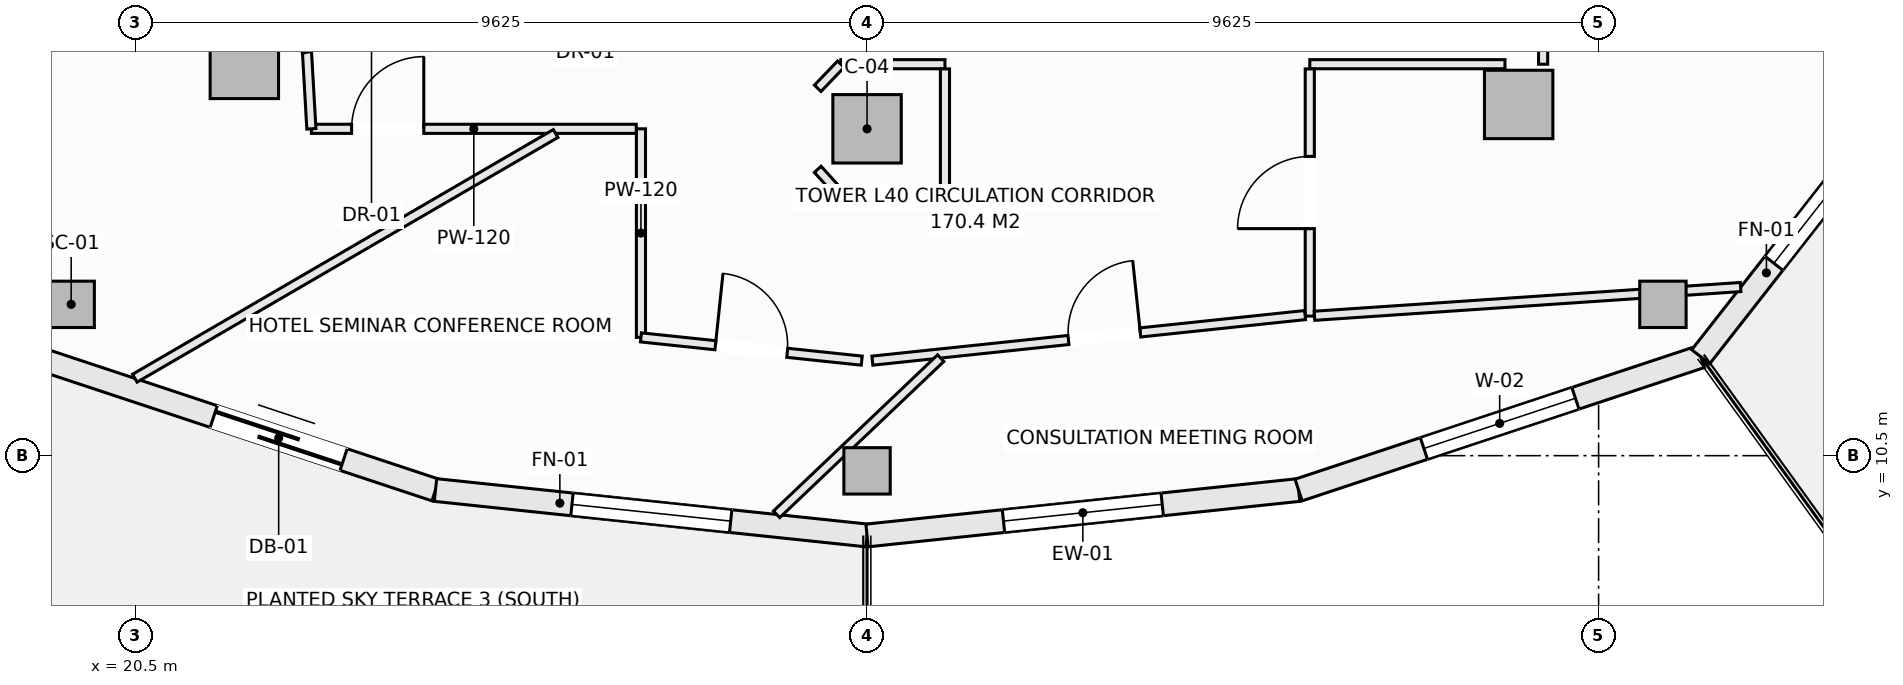
"""IFC4 building model, lengths in metres.
Left out: names, types, materials, properties, quantities, classifications, styles, units other than length and angle.
Written with IfcOpenShell. Run it as: python <this file> out.ifc"""

import sys

from ifc_helpers import new_model, si_unit, direction, frame, frame_2d, origin, origin_2d, place, context, subcontext, project, spatial, rectangle, hollow_rectangle, extrude, element, fill, save


model = new_model("IFC4")
c1 = context("Model", 3, precision=1e-05, world=origin(), true_north=direction((0.0, 1.0)))
c2 = subcontext(c1, "Body", "Model", "MODEL_VIEW")
j1 = project(units=[si_unit("LENGTHUNIT", "METRE"), si_unit("PLANEANGLEUNIT", "RADIAN")], contexts=[c1])
p1 = place(None, origin())
s1 = spatial("IfcSite", under=j1, at=p1, CompositionType="ELEMENT")
p2 = place(p1, origin())
s2 = spatial("IfcBuilding", under=s1, at=p2, CompositionType="ELEMENT")
p3 = place(p2, frame((0.0, 0.0, 156.3)))
s3 = spatial("IfcBuildingStorey", under=s2, at=p3, CompositionType="ELEMENT", Elevation=156.3)
for number, where, z_axis, x_axis in (
    (1, (19.654, 12.49, -0.27), (0.0, 0.0, 1.0), (1.0, 0.0, 0.0)),
    (2, (30.125, 10.3, -0.27), (0.0, 0.0, 1.0), (1.0, 0.0, 0.0)),
    (3, (40.596, 12.49, -0.27), (0.0, 0.0, 1.0), (1.0, 0.0, 0.0)),
):
    element("IfcColumn", number, at=place(p3, frame(where, z_axis=z_axis, x_axis=x_axis)), inside=s3, PredefinedType="COLUMN", context=c2, shape_type="SweptSolid", body=[
        extrude(hollow_rectangle(XDim=0.61, YDim=0.61, WallThickness=0.025, at=origin_2d()), origin(), (0.0, 0.0, 1.0), 3.4),
    ])
for number, where, z_axis, x_axis in (
    (4, (21.932, 15.648, -0.27), (0.0, 0.0, 1.0), (1.0, 0.0, 0.0)),
    (5, (30.125, 14.8, -0.27), (0.0, 0.0, 1.0), (1.0, 0.0, 0.0)),
    (6, (38.698, 15.121, -0.27), (0.0, 0.0, 1.0), (1.0, 0.0, 0.0)),
):
    element("IfcColumn", number, at=place(p3, frame(where, z_axis=z_axis, x_axis=x_axis)), inside=s3, PredefinedType="COLUMN", context=c2, shape_type="SweptSolid", body=[
        extrude(rectangle(XDim=0.9, YDim=0.9, at=origin_2d()), origin(), (0.0, 0.0, 1.0), 3.4),
    ])
p4 = place(p3, frame((19.156, 11.801, 0.0), z_axis=(0.0, 0.0, 1.0), x_axis=(0.949246811547, -0.314532177636, 0.0)))
e7 = element("IfcWall", 7, at=p4, inside=s3, PredefinedType="SOLIDWALL", context=c2, shape_type="SweptSolid", body=[
    extrude(rectangle(XDim=5.574, YDim=0.3, at=frame_2d((2.787, 0.0))), origin(), (0.0, 0.0, 1.0), 2.653),
])
p5 = place(p4, frame((2.5, 0.0, 0.0)))
e8 = element("IfcOpeningElement", 8, at=p5, cuts=e7, PredefinedType="OPENING", context=c2, shape_type="SweptSolid", body=[
    extrude(rectangle(XDim=1.8, YDim=2.25, at=frame_2d((0.9, 1.125))), frame((0.0, 0.16, 0.0), z_axis=(0.0, -1.0, 0.0), x_axis=(1.0, 0.0, 0.0)), (0.0, 0.0, 1.0), 0.32),
])
p6 = place(p3, frame((24.447, 10.048, 0.0), z_axis=(0.0, 0.0, 1.0), x_axis=(0.994496545245, -0.104769372887, 0.0)))
e9 = element("IfcWall", 9, at=p6, inside=s3, PredefinedType="SOLIDWALL", context=c2, shape_type="SweptSolid", body=[
    extrude(rectangle(XDim=5.709, YDim=0.3, at=frame_2d((2.854, 0.0))), origin(), (0.0, 0.0, 1.0), 2.653),
])
p7 = place(p6, frame((1.805, 0.0, 0.74)))
e10 = element("IfcOpeningElement", 10, at=p7, cuts=e9, PredefinedType="OPENING", context=c2, shape_type="SweptSolid", body=[
    extrude(rectangle(XDim=2.1, YDim=1.7, at=frame_2d((1.05, 0.85))), frame((0.0, 0.16, 0.0), z_axis=(0.0, -1.0, 0.0), x_axis=(1.0, 0.0, 0.0)), (0.0, 0.0, 1.0), 0.32),
])
p8 = place(p3, frame((30.125, 9.45, 0.0), z_axis=(0.0, 0.0, 1.0), x_axis=(0.994496545245, 0.104769372887, 0.0)))
e11 = element("IfcWall", 11, at=p8, inside=s3, PredefinedType="SOLIDWALL", context=c2, shape_type="SweptSolid", body=[
    extrude(rectangle(XDim=5.709, YDim=0.3, at=frame_2d((2.854, 0.0))), origin(), (0.0, 0.0, 1.0), 2.653),
])
p9 = place(p8, frame((1.805, 0.0, 0.74)))
e12 = element("IfcOpeningElement", 12, at=p9, cuts=e11, PredefinedType="OPENING", context=c2, shape_type="SweptSolid", body=[
    extrude(rectangle(XDim=2.1, YDim=1.7, at=frame_2d((1.05, 0.85))), frame((0.0, 0.16, 0.0), z_axis=(0.0, -1.0, 0.0), x_axis=(1.0, 0.0, 0.0)), (0.0, 0.0, 1.0), 0.32),
])
p10 = place(p3, frame((35.803, 10.048, 0.0), z_axis=(0.0, 0.0, 1.0), x_axis=(0.949246811547, 0.314532177636, 0.0)))
e13 = element("IfcWall", 13, at=p10, inside=s3, PredefinedType="SOLIDWALL", context=c2, shape_type="SweptSolid", body=[
    extrude(rectangle(XDim=5.574, YDim=0.3, at=frame_2d((2.787, 0.0))), origin(), (0.0, 0.0, 1.0), 2.653),
])
p11 = place(p10, frame((1.737, 0.0, 0.74)))
e14 = element("IfcOpeningElement", 14, at=p11, cuts=e13, PredefinedType="OPENING", context=c2, shape_type="SweptSolid", body=[
    extrude(rectangle(XDim=2.1, YDim=1.7, at=frame_2d((1.05, 0.85))), frame((0.0, 0.16, 0.0), z_axis=(0.0, -1.0, 0.0), x_axis=(1.0, 0.0, 0.0)), (0.0, 0.0, 1.0), 0.32),
])
p12 = place(p3, frame((41.094, 11.801, 0.0), z_axis=(0.0, 0.0, 1.0), x_axis=(0.616429245738, 0.787410302828, 0.0)))
e15 = element("IfcWall", 15, at=p12, inside=s3, PredefinedType="SOLIDWALL", context=c2, shape_type="SweptSolid", body=[
    extrude(rectangle(XDim=5.223, YDim=0.3, at=frame_2d((2.612, 0.0))), origin(), (0.0, 0.0, 1.0), 2.653),
])
p13 = place(p12, frame((1.562, 0.0, 0.74)))
e16 = element("IfcOpeningElement", 16, at=p13, cuts=e15, PredefinedType="OPENING", context=c2, shape_type="SweptSolid", body=[
    extrude(rectangle(XDim=2.1, YDim=1.7, at=frame_2d((1.05, 0.85))), frame((0.0, 0.16, 0.0), z_axis=(0.0, -1.0, 0.0), x_axis=(1.0, 0.0, 0.0)), (0.0, 0.0, 1.0), 0.32),
])
p14 = place(p3, frame((17.143, 9.082, 0.0), z_axis=(0.0, 0.0, 1.0), x_axis=(0.940948576924, -0.338549517184, 0.0)))
e17 = element("IfcWall", 17, at=p14, inside=s3, PredefinedType="PARAPET", context=c2, shape_type="SweptSolid", body=[
    extrude(rectangle(XDim=6.664, YDim=0.22, at=frame_2d((3.332, 0.0))), origin(), (0.0, 0.0, 1.0), 0.52),
])
p15 = place(p3, frame((27.15, 12.056, 0.0), z_axis=(0.0, 0.0, 1.0), x_axis=(0.0, 1.0, 0.0)))
e18 = element("IfcWall", 18, at=p15, inside=s3, PredefinedType="PARTITIONING", context=c2, shape_type="SweptSolid", body=[
    extrude(rectangle(XDim=2.744, YDim=0.12, at=frame_2d((1.372, 0.0))), origin(), (0.0, 0.0, 1.0), 3.13),
])
p16 = place(p3, frame((39.02, 15.65, 0.0), z_axis=(0.0, 0.0, 1.0), x_axis=(0.0, 1.0, 0.0)))
e19 = element("IfcWall", 19, at=p16, inside=s3, PredefinedType="PARTITIONING", context=c2, shape_type="SweptSolid", body=[
    extrude(rectangle(XDim=1.36, YDim=0.12, at=frame_2d((0.68, 0.0))), origin(), (0.0, 0.0, 1.0), 2.505),
])
p17 = place(p3, frame((29.78, 15.65, 0.0), z_axis=(0.0, 0.0, 1.0), x_axis=(1.0, 0.0, 0.0)))
e20 = element("IfcWall", 20, at=p17, inside=s3, PredefinedType="PARTITIONING", context=c2, shape_type="SweptSolid", body=[
    extrude(rectangle(XDim=1.37, YDim=0.12, at=frame_2d((0.685, 0.0))), origin(), (0.0, 0.0, 1.0), 3.13),
])
p18 = place(p3, frame((35.95, 15.65, 0.0), z_axis=(0.0, 0.0, 1.0), x_axis=(1.0, 0.0, 0.0)))
e21 = element("IfcWall", 21, at=p18, inside=s3, PredefinedType="PARTITIONING", context=c2, shape_type="SweptSolid", body=[
    extrude(rectangle(XDim=2.568, YDim=0.12, at=frame_2d((1.284, 0.0))), origin(), (0.0, 0.0, 1.0), 3.13),
])
p19 = place(p3, frame((35.95, 12.336, 0.0), z_axis=(0.0, 0.0, 1.0), x_axis=(0.0, 1.0, 0.0)))
e22 = element("IfcWall", 22, at=p19, inside=s3, PredefinedType="PARTITIONING", context=c2, shape_type="SweptSolid", body=[
    extrude(rectangle(XDim=3.252, YDim=0.12, at=frame_2d((1.626, 0.0))), origin(), (0.0, 0.0, 1.0), 3.13),
])
p20 = place(p19, frame((1.151, 0.0, 0.0)))
e23 = element("IfcOpeningElement", 23, at=p20, cuts=e22, PredefinedType="OPENING", context=c2, shape_type="SweptSolid", body=[
    extrude(rectangle(XDim=0.95, YDim=2.1, at=frame_2d((0.475, 1.05))), frame((0.0, 0.07, 0.0), z_axis=(0.0, -1.0, 0.0), x_axis=(1.0, 0.0, 0.0)), (0.0, 0.0, 1.0), 0.14),
])
p21 = place(p3, frame((30.195, 11.75, 0.0), z_axis=(0.0, 0.0, 1.0), x_axis=(0.994498907508, 0.104746947287, 0.0)))
e24 = element("IfcWall", 24, at=p21, inside=s3, PredefinedType="PARTITIONING", context=c2, shape_type="SweptSolid", body=[
    extrude(rectangle(XDim=5.724, YDim=0.12, at=frame_2d((2.862, 0.0))), origin(), (0.0, 0.0, 1.0), 3.13),
])
p22 = place(p21, frame((2.594, 0.0, 0.0)))
e25 = element("IfcOpeningElement", 25, at=p22, cuts=e24, PredefinedType="OPENING", context=c2, shape_type="SweptSolid", body=[
    extrude(rectangle(XDim=0.95, YDim=2.1, at=frame_2d((0.475, 1.05))), frame((0.0, 0.07, 0.0), z_axis=(0.0, -1.0, 0.0), x_axis=(1.0, 0.0, 0.0)), (0.0, 0.0, 1.0), 0.14),
])
p23 = place(p3, frame((27.15, 12.056, 0.0), z_axis=(0.0, 0.0, 1.0), x_axis=(0.994501330468, -0.104723940422, 0.0)))
e26 = element("IfcWall", 26, at=p23, inside=s3, PredefinedType="PARTITIONING", context=c2, shape_type="SweptSolid", body=[
    extrude(rectangle(XDim=2.921, YDim=0.12, at=frame_2d((1.46, 0.0))), origin(), (0.0, 0.0, 1.0), 3.13),
])
p24 = place(p23, frame((0.986, 0.0, 0.0)))
e27 = element("IfcOpeningElement", 27, at=p24, cuts=e26, PredefinedType="OPENING", context=c2, shape_type="SweptSolid", body=[
    extrude(rectangle(XDim=0.95, YDim=2.1, at=frame_2d((0.475, 1.05))), frame((0.0, 0.07, 0.0), z_axis=(0.0, -1.0, 0.0), x_axis=(1.0, 0.0, 0.0)), (0.0, 0.0, 1.0), 0.14),
])
p25 = place(p3, frame((22.814, 14.8, 0.0), z_axis=(0.0, 0.0, 1.0), x_axis=(1.0, 0.0, 0.0)))
e28 = element("IfcWall", 28, at=p25, inside=s3, PredefinedType="PARTITIONING", context=c2, shape_type="SweptSolid", body=[
    extrude(rectangle(XDim=4.274, YDim=0.12, at=frame_2d((2.137, 0.0))), origin(), (0.0, 0.0, 1.0), 3.13),
])
p26 = place(p25, frame((0.529, 0.0, 0.0)))
e29 = element("IfcOpeningElement", 29, at=p26, cuts=e28, PredefinedType="OPENING", context=c2, shape_type="SweptSolid", body=[
    extrude(rectangle(XDim=0.95, YDim=2.1, at=frame_2d((0.475, 1.05))), frame((0.0, 0.07, 0.0), z_axis=(0.0, -1.0, 0.0), x_axis=(1.0, 0.0, 0.0)), (0.0, 0.0, 1.0), 0.14),
])
p27 = place(p3, frame((22.756, 15.811, 0.0), z_axis=(0.0, 0.0, 1.0), x_axis=(0.057139047697, -0.998366230012, 0.0)))
e30 = element("IfcWall", 30, at=p27, inside=s3, PredefinedType="PARTITIONING", context=c2, shape_type="SweptSolid", body=[
    extrude(rectangle(XDim=1.013, YDim=0.12, at=frame_2d((0.506, 0.0))), origin(), (0.0, 0.0, 1.0), 3.13),
])
p28 = place(p3, frame((22.353, 16.958, 0.0), z_axis=(0.0, 0.0, 1.0), x_axis=(0.331370038458, -0.943500873138, 0.0)))
e31 = element("IfcWall", 31, at=p28, inside=s3, PredefinedType="PARTITIONING", context=c2, shape_type="SweptSolid", body=[
    extrude(rectangle(XDim=1.216, YDim=0.12, at=frame_2d((0.608, 0.0))), origin(), (0.0, 0.0, 1.0), 3.13),
])
p29 = place(p3, frame((29.476, 15.333, 0.0), z_axis=(0.0, 0.0, 1.0), x_axis=(0.692219273951, 0.721687243043, 0.0)))
e32 = element("IfcWall", 32, at=p29, inside=s3, PredefinedType="PARTITIONING", context=c2, shape_type="SweptSolid", body=[
    extrude(rectangle(XDim=0.439, YDim=0.12, at=frame_2d((0.22, 0.0))), origin(), (0.0, 0.0, 1.0), 3.13),
])
p30 = place(p3, frame((29.476, 14.267, 0.0), z_axis=(0.0, 0.0, 1.0), x_axis=(0.670659392016, -0.741765448037, 0.0)))
e33 = element("IfcWall", 33, at=p30, inside=s3, PredefinedType="PARTITIONING", context=c2, shape_type="SweptSolid", body=[
    extrude(rectangle(XDim=0.453, YDim=0.12, at=frame_2d((0.227, 0.0))), origin(), (0.0, 0.0, 1.0), 3.13),
])
p31 = place(p3, frame((29.78, 13.85, 0.0), z_axis=(0.0, 0.0, 1.0), x_axis=(1.0, 0.0, 0.0)))
e34 = element("IfcWall", 34, at=p31, inside=s3, PredefinedType="PARTITIONING", context=c2, shape_type="SweptSolid", body=[
    extrude(rectangle(XDim=1.37, YDim=0.12, at=frame_2d((0.685, 0.0))), origin(), (0.0, 0.0, 1.0), 3.13),
])
p32 = place(p3, frame((31.15, 13.912, 0.0), z_axis=(0.0, 0.0, 1.0), x_axis=(0.0, 1.0, 0.0)))
e35 = element("IfcWall", 35, at=p32, inside=s3, PredefinedType="PARTITIONING", context=c2, shape_type="SweptSolid", body=[
    extrude(rectangle(XDim=1.676, YDim=0.12, at=frame_2d((0.838, 0.0))), origin(), (0.0, 0.0, 1.0), 3.13),
])
p33 = place(p3, frame((20.491, 11.519, 0.0), z_axis=(0.0, 0.0, 1.0), x_axis=(0.864495629624, 0.502640334991, 0.0)))
e36 = element("IfcWall", 36, at=p33, inside=s3, PredefinedType="PARTITIONING", context=c2, shape_type="SweptSolid", body=[
    extrude(rectangle(XDim=6.404, YDim=0.12, at=frame_2d((3.202, 0.0))), origin(), (0.0, 0.0, 1.0), 3.13),
])
p34 = place(p3, frame((28.935, 9.728, 0.0), z_axis=(0.0, 0.0, 1.0), x_axis=(0.724541098321, 0.689231598843, 0.0)))
e37 = element("IfcWall", 37, at=p34, inside=s3, PredefinedType="PARTITIONING", context=c2, shape_type="SweptSolid", body=[
    extrude(rectangle(XDim=2.98, YDim=0.12, at=frame_2d((1.49, 0.0))), origin(), (0.0, 0.0, 1.0), 3.13),
])
p35 = place(p3, frame((36.012, 12.34, 0.0), z_axis=(0.0, 0.0, 1.0), x_axis=(0.997733146572, 0.067294637466, 0.0)))
e38 = element("IfcWall", 38, at=p35, inside=s3, PredefinedType="PARTITIONING", context=c2, shape_type="SweptSolid", body=[
    extrude(rectangle(XDim=5.62, YDim=0.12, at=frame_2d((2.81, 0.0))), origin(), (0.0, 0.0, 1.0), 2.653),
])
p36 = place(p5, frame((1.8, 0.0, 0.0), z_axis=(0.0, 0.0, 1.0), x_axis=(-1.0, 0.0, 0.0)))
e39 = element("IfcDoor", 39, at=p36, inside=s3, OperationType="SLIDING_TO_LEFT", PredefinedType="DOOR", context=c2, shape_type="SweptSolid", body=[
    extrude(rectangle(XDim=1.8, YDim=2.25, at=frame_2d((0.9, 1.125))), frame((0.0, 0.025, 0.0), z_axis=(0.0, -1.0, 0.0), x_axis=(1.0, 0.0, 0.0)), (0.0, 0.0, 1.0), 0.05),
])
fill(e8, e39)
p37 = place(p7, origin())
e40 = element("IfcWindow", 40, at=p37, inside=s3, PartitioningType="SINGLE_PANEL", PredefinedType="WINDOW", context=c2, shape_type="SweptSolid", body=[
    extrude(rectangle(XDim=2.1, YDim=1.7, at=frame_2d((1.05, 0.85))), frame((0.0, 0.03, 0.0), z_axis=(0.0, -1.0, 0.0), x_axis=(1.0, 0.0, 0.0)), (0.0, 0.0, 1.0), 0.06),
])
fill(e10, e40)
p38 = place(p9, origin())
e41 = element("IfcWindow", 41, at=p38, inside=s3, PartitioningType="SINGLE_PANEL", PredefinedType="WINDOW", context=c2, shape_type="SweptSolid", body=[
    extrude(rectangle(XDim=2.1, YDim=1.7, at=frame_2d((1.05, 0.85))), frame((0.0, 0.03, 0.0), z_axis=(0.0, -1.0, 0.0), x_axis=(1.0, 0.0, 0.0)), (0.0, 0.0, 1.0), 0.06),
])
fill(e12, e41)
p39 = place(p11, origin())
e42 = element("IfcWindow", 42, at=p39, inside=s3, PartitioningType="SINGLE_PANEL", PredefinedType="WINDOW", context=c2, shape_type="SweptSolid", body=[
    extrude(rectangle(XDim=2.1, YDim=1.7, at=frame_2d((1.05, 0.85))), frame((0.0, 0.03, 0.0), z_axis=(0.0, -1.0, 0.0), x_axis=(1.0, 0.0, 0.0)), (0.0, 0.0, 1.0), 0.06),
])
fill(e14, e42)
p40 = place(p13, origin())
e43 = element("IfcWindow", 43, at=p40, inside=s3, PartitioningType="SINGLE_PANEL", PredefinedType="WINDOW", context=c2, shape_type="SweptSolid", body=[
    extrude(rectangle(XDim=2.1, YDim=1.7, at=frame_2d((1.05, 0.85))), frame((0.0, 0.03, 0.0), z_axis=(0.0, -1.0, 0.0), x_axis=(1.0, 0.0, 0.0)), (0.0, 0.0, 1.0), 0.06),
])
fill(e16, e43)
p41 = place(p26, origin())
e44 = element("IfcDoor", 44, at=p41, inside=s3, OperationType="SINGLE_SWING_RIGHT", PredefinedType="DOOR", context=c2, shape_type="SweptSolid", body=[
    extrude(rectangle(XDim=0.95, YDim=2.1, at=frame_2d((0.475, 1.05))), frame((0.0, 0.025, 0.0), z_axis=(0.0, -1.0, 0.0), x_axis=(1.0, 0.0, 0.0)), (0.0, 0.0, 1.0), 0.05),
])
fill(e29, e44)
p42 = place(p24, origin())
e45 = element("IfcDoor", 45, at=p42, inside=s3, OperationType="SINGLE_SWING_LEFT", PredefinedType="DOOR", context=c2, shape_type="SweptSolid", body=[
    extrude(rectangle(XDim=0.95, YDim=2.1, at=frame_2d((0.475, 1.05))), frame((0.0, 0.025, 0.0), z_axis=(0.0, -1.0, 0.0), x_axis=(1.0, 0.0, 0.0)), (0.0, 0.0, 1.0), 0.05),
])
fill(e27, e45)
p43 = place(p22, origin())
e46 = element("IfcDoor", 46, at=p43, inside=s3, OperationType="SINGLE_SWING_RIGHT", PredefinedType="DOOR", context=c2, shape_type="SweptSolid", body=[
    extrude(rectangle(XDim=0.95, YDim=2.1, at=frame_2d((0.475, 1.05))), frame((0.0, 0.025, 0.0), z_axis=(0.0, -1.0, 0.0), x_axis=(1.0, 0.0, 0.0)), (0.0, 0.0, 1.0), 0.05),
])
fill(e25, e46)
p44 = place(p20, origin())
e47 = element("IfcDoor", 47, at=p44, inside=s3, OperationType="SINGLE_SWING_LEFT", PredefinedType="DOOR", context=c2, shape_type="SweptSolid", body=[
    extrude(rectangle(XDim=0.95, YDim=2.1, at=frame_2d((0.475, 1.05))), frame((0.0, 0.025, 0.0), z_axis=(0.0, -1.0, 0.0), x_axis=(1.0, 0.0, 0.0)), (0.0, 0.0, 1.0), 0.05),
])
fill(e23, e47)
save(model, sys.argv[1])
